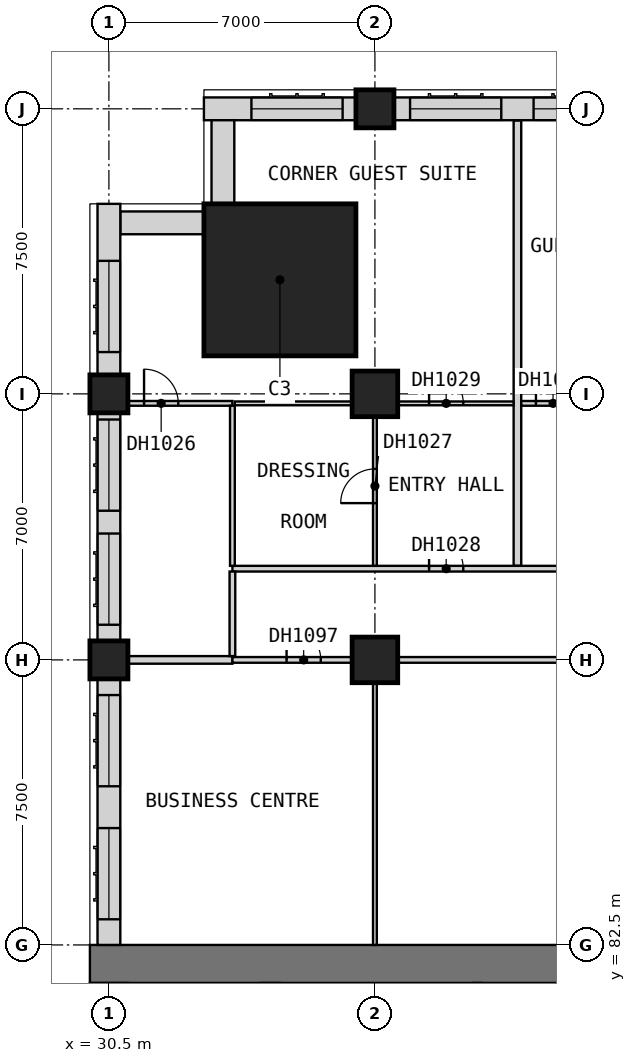
"""IFC4 building model, lengths in metres.
Left out: names, types, materials, properties, quantities, classifications, styles, units other than length and angle.
Written with IfcOpenShell. Run it as: python <this file> out.ifc"""

import sys

from ifc_helpers import new_model, si_unit, direction, frame, frame_2d, origin, origin_2d, place, context, subcontext, project, spatial, rectangle, extrude, element, fill, save


model = new_model("IFC4")
c1 = context("Model", 3, precision=1e-05, world=origin(), true_north=direction((0.0, 1.0)))
c2 = subcontext(c1, "Body", "Model", "MODEL_VIEW")
j1 = project(units=[si_unit("LENGTHUNIT", "METRE"), si_unit("PLANEANGLEUNIT", "RADIAN")], contexts=[c1])
p1 = place(None, origin())
s1 = spatial("IfcSite", under=j1, at=p1, CompositionType="ELEMENT")
p2 = place(p1, origin())
s2 = spatial("IfcBuilding", under=s1, at=p2, CompositionType="ELEMENT")
p3 = place(p2, frame((0.0, 0.0, 48.4)))
s3 = spatial("IfcBuildingStorey", under=s2, at=p3, CompositionType="ELEMENT", Elevation=48.4)
for number, where, z_axis, x_axis in (
    (1, (30.5, 90.0, 0.0), (0.0, 0.0, 1.0), (1.0, 0.0, 0.0)),
    (2, (30.5, 97.0, 0.0), (0.0, 0.0, 1.0), (1.0, 0.0, 0.0)),
):
    element("IfcColumn", number, at=place(p3, frame(where, z_axis=z_axis, x_axis=x_axis)), inside=s3, PredefinedType="COLUMN", context=c2, shape_type="SweptSolid", body=[
        extrude(rectangle(XDim=1.0, YDim=1.0, at=origin_2d()), origin(), (0.0, 0.0, 1.0), 3.6),
    ])
for number, where, z_axis, x_axis in (
    (3, (37.5, 90.0, 0.0), (0.0, 0.0, 1.0), (1.0, 0.0, 0.0)),
    (4, (37.5, 97.0, 0.0), (0.0, 0.0, 1.0), (1.0, 0.0, 0.0)),
):
    element("IfcColumn", number, at=place(p3, frame(where, z_axis=z_axis, x_axis=x_axis)), inside=s3, PredefinedType="COLUMN", context=c2, shape_type="SweptSolid", body=[
        extrude(rectangle(XDim=1.2, YDim=1.2, at=origin_2d()), origin(), (0.0, 0.0, 1.0), 3.6),
    ])
p4 = place(p3, frame((37.5, 104.5, 0.0), z_axis=(0.0, 0.0, 1.0), x_axis=(1.0, 0.0, 0.0)))
e5 = element("IfcColumn", 5, at=p4, inside=s3, PredefinedType="COLUMN", context=c2, shape_type="SweptSolid", body=[
    extrude(rectangle(XDim=1.0, YDim=1.0, at=origin_2d()), origin(), (0.0, 0.0, 1.0), 3.6),
])
p5 = place(p3, frame((35.0, 100.0, 0.0), z_axis=(0.0, 0.0, 1.0), x_axis=(1.0, 0.0, 0.0)))
e6 = element("IfcColumn", 6, at=p5, inside=s3, PredefinedType="COLUMN", context=c2, shape_type="SweptSolid", body=[
    extrude(rectangle(XDim=4.0, YDim=4.0, at=origin_2d()), origin(), (0.0, 0.0, 1.0), 3.6),
])
p6 = place(p3, frame((30.0, 82.0, 0.0), z_axis=(0.0, 0.0, 1.0), x_axis=(1.0, 0.0, 0.0)))
e7 = element("IfcWall", 7, at=p6, inside=s3, PredefinedType="SHEAR", context=c2, shape_type="SweptSolid", body=[
    extrude(rectangle(XDim=30.0, YDim=1.0, at=frame_2d((15.0, 0.0))), origin(), (0.0, 0.0, 1.0), 3.6),
])
p7 = place(p3, frame((34.75, 78.3, 0.0), z_axis=(0.0, 0.0, 1.0), x_axis=(0.0, 1.0, 0.0)))
e8 = element("IfcWall", 8, at=p7, inside=s3, PredefinedType="SHEAR", context=c2, shape_type="SweptSolid", body=[
    extrude(rectangle(XDim=3.2, YDim=0.5, at=frame_2d((1.6, 0.0))), origin(), (0.0, 0.0, 1.0), 3.6),
])
p8 = place(p3, frame((44.5, 104.5, 0.0), z_axis=(0.0, 0.0, 1.0), x_axis=(-1.0, 0.0, 0.0)))
e9 = element("IfcWall", 9, at=p8, inside=s3, PredefinedType="SOLIDWALL", context=c2, shape_type="SweptSolid", body=[
    extrude(rectangle(XDim=6.5, YDim=0.6, at=frame_2d((3.25, 0.0))), origin(), (0.0, 0.0, 1.0), 2.85),
])
p9 = place(p8, frame((3.675, 0.0, 0.8)))
e10 = element("IfcOpeningElement", 10, at=p9, cuts=e9, PredefinedType="OPENING", context=c2, shape_type="SweptSolid", body=[
    extrude(rectangle(XDim=2.4, YDim=1.8, at=frame_2d((1.2, 0.9))), frame((0.0, 0.31, 0.0), z_axis=(0.0, -1.0, 0.0), x_axis=(1.0, 0.0, 0.0)), (0.0, 0.0, 1.0), 0.62),
])
p10 = place(p8, frame((0.425, 0.0, 0.8)))
e11 = element("IfcOpeningElement", 11, at=p10, cuts=e9, PredefinedType="OPENING", context=c2, shape_type="SweptSolid", body=[
    extrude(rectangle(XDim=2.4, YDim=1.8, at=frame_2d((1.2, 0.9))), frame((0.0, 0.31, 0.0), z_axis=(0.0, -1.0, 0.0), x_axis=(1.0, 0.0, 0.0)), (0.0, 0.0, 1.0), 0.62),
])
p11 = place(p3, frame((37.0, 104.5, 0.0), z_axis=(0.0, 0.0, 1.0), x_axis=(-1.0, 0.0, 0.0)))
e12 = element("IfcWall", 12, at=p11, inside=s3, PredefinedType="SOLIDWALL", context=c2, shape_type="SweptSolid", body=[
    extrude(rectangle(XDim=4.0, YDim=0.6, at=frame_2d((2.0, 0.0))), origin(), (0.0, 0.0, 1.0), 3.35),
])
p12 = place(p11, frame((0.35, 0.0, 0.8)))
e13 = element("IfcOpeningElement", 13, at=p12, cuts=e12, PredefinedType="OPENING", context=c2, shape_type="SweptSolid", body=[
    extrude(rectangle(XDim=2.4, YDim=1.8, at=frame_2d((1.2, 0.9))), frame((0.0, 0.31, 0.0), z_axis=(0.0, -1.0, 0.0), x_axis=(1.0, 0.0, 0.0)), (0.0, 0.0, 1.0), 0.62),
])
for number, where, z_axis, x_axis in (
    (14, (33.5, 104.2, 0.0), (0.0, 0.0, 1.0), (0.0, -1.0, 0.0)),
    (15, (33.0, 101.5, 0.0), (0.0, 0.0, 1.0), (-1.0, 0.0, 0.0)),
):
    element("IfcWall", number, at=place(p3, frame(where, z_axis=z_axis, x_axis=x_axis)), inside=s3, PredefinedType="SOLIDWALL", context=c2, shape_type="SweptSolid", body=[
        extrude(rectangle(XDim=2.2, YDim=0.6, at=frame_2d((1.1, 0.0))), origin(), (0.0, 0.0, 1.0), 3.35),
    ])
p13 = place(p3, frame((30.5, 102.0, 0.0), z_axis=(0.0, 0.0, 1.0), x_axis=(0.0, -1.0, 0.0)))
e16 = element("IfcWall", 16, at=p13, inside=s3, PredefinedType="SOLIDWALL", context=c2, shape_type="SweptSolid", body=[
    extrude(rectangle(XDim=4.5, YDim=0.6, at=frame_2d((2.25, 0.0))), origin(), (0.0, 0.0, 1.0), 3.35),
])
p14 = place(p13, frame((1.5, 0.0, 0.8)))
e17 = element("IfcOpeningElement", 17, at=p14, cuts=e16, PredefinedType="OPENING", context=c2, shape_type="SweptSolid", body=[
    extrude(rectangle(XDim=2.4, YDim=1.8, at=frame_2d((1.2, 0.9))), frame((0.0, 0.31, 0.0), z_axis=(0.0, -1.0, 0.0), x_axis=(1.0, 0.0, 0.0)), (0.0, 0.0, 1.0), 0.62),
])
p15 = place(p3, frame((30.5, 96.5, 0.0), z_axis=(0.0, 0.0, 1.0), x_axis=(0.0, -1.0, 0.0)))
e18 = element("IfcWall", 18, at=p15, inside=s3, PredefinedType="SOLIDWALL", context=c2, shape_type="SweptSolid", body=[
    extrude(rectangle(XDim=6.0, YDim=0.6, at=frame_2d((3.0, 0.0))), origin(), (0.0, 0.0, 1.0), 2.85),
])
p16 = place(p15, frame((3.175, 0.0, 0.8)))
e19 = element("IfcOpeningElement", 19, at=p16, cuts=e18, PredefinedType="OPENING", context=c2, shape_type="SweptSolid", body=[
    extrude(rectangle(XDim=2.4, YDim=1.8, at=frame_2d((1.2, 0.9))), frame((0.0, 0.31, 0.0), z_axis=(0.0, -1.0, 0.0), x_axis=(1.0, 0.0, 0.0)), (0.0, 0.0, 1.0), 0.62),
])
p17 = place(p15, frame((0.175, 0.0, 0.8)))
e20 = element("IfcOpeningElement", 20, at=p17, cuts=e18, PredefinedType="OPENING", context=c2, shape_type="SweptSolid", body=[
    extrude(rectangle(XDim=2.4, YDim=1.8, at=frame_2d((1.2, 0.9))), frame((0.0, 0.31, 0.0), z_axis=(0.0, -1.0, 0.0), x_axis=(1.0, 0.0, 0.0)), (0.0, 0.0, 1.0), 0.62),
])
p18 = place(p3, frame((30.5, 89.5, 0.0), z_axis=(0.0, 0.0, 1.0), x_axis=(0.0, -1.0, 0.0)))
e21 = element("IfcWall", 21, at=p18, inside=s3, PredefinedType="SOLIDWALL", context=c2, shape_type="SweptSolid", body=[
    extrude(rectangle(XDim=7.0, YDim=0.6, at=frame_2d((3.5, 0.0))), origin(), (0.0, 0.0, 1.0), 3.35),
])
p19 = place(p18, frame((3.925, 0.0, 0.8)))
e22 = element("IfcOpeningElement", 22, at=p19, cuts=e21, PredefinedType="OPENING", context=c2, shape_type="SweptSolid", body=[
    extrude(rectangle(XDim=2.4, YDim=1.8, at=frame_2d((1.2, 0.9))), frame((0.0, 0.31, 0.0), z_axis=(0.0, -1.0, 0.0), x_axis=(1.0, 0.0, 0.0)), (0.0, 0.0, 1.0), 0.62),
])
p20 = place(p18, frame((0.425, 0.0, 0.8)))
e23 = element("IfcOpeningElement", 23, at=p20, cuts=e21, PredefinedType="OPENING", context=c2, shape_type="SweptSolid", body=[
    extrude(rectangle(XDim=2.4, YDim=1.8, at=frame_2d((1.2, 0.9))), frame((0.0, 0.31, 0.0), z_axis=(0.0, -1.0, 0.0), x_axis=(1.0, 0.0, 0.0)), (0.0, 0.0, 1.0), 0.62),
])
p21 = place(p3, frame((30.0, 90.0, 0.0), z_axis=(0.0, 0.0, 1.0), x_axis=(1.0, 0.0, 0.0)))
e24 = element("IfcWall", 24, at=p21, inside=s3, PredefinedType="PARTITIONING", context=c2, shape_type="SweptSolid", body=[
    extrude(rectangle(XDim=3.75, YDim=0.2, at=frame_2d((1.875, 0.0))), origin(), (0.0, 0.0, 1.0), 3.35),
])
p22 = place(p3, frame((41.25, 92.475, 0.0), z_axis=(0.0, 0.0, 1.0), x_axis=(0.0, 1.0, 0.0)))
e25 = element("IfcWall", 25, at=p22, inside=s3, PredefinedType="PARTITIONING", context=c2, shape_type="SweptSolid", body=[
    extrude(rectangle(XDim=11.715, YDim=0.2, at=frame_2d((5.857, 0.0))), origin(), (0.0, 0.0, 1.0), 3.35),
])
p23 = place(p3, frame((33.75, 90.0, 0.0), z_axis=(0.0, 0.0, 1.0), x_axis=(1.0, 0.0, 0.0)))
e26 = element("IfcWall", 26, at=p23, inside=s3, PredefinedType="PARTITIONING", context=c2, shape_type="SweptSolid", body=[
    extrude(rectangle(XDim=41.25, YDim=0.15, at=frame_2d((20.625, 0.0))), origin(), (0.0, 0.0, 1.0), 3.35),
])
p24 = place(p23, frame((1.425, 0.0, 0.0)))
e27 = element("IfcOpeningElement", 27, at=p24, cuts=e26, PredefinedType="OPENING", context=c2, shape_type="SweptSolid", body=[
    extrude(rectangle(XDim=0.9, YDim=2.1, at=frame_2d((0.45, 1.05))), frame((0.0, 0.085, 0.0), z_axis=(0.0, -1.0, 0.0), x_axis=(1.0, 0.0, 0.0)), (0.0, 0.0, 1.0), 0.17),
])
p25 = place(p23, frame((12.45, 0.0, 0.0)))
e28 = element("IfcOpeningElement", 28, at=p25, cuts=e26, PredefinedType="OPENING", context=c2, shape_type="SweptSolid", body=[
    extrude(rectangle(XDim=0.9, YDim=2.1, at=frame_2d((0.45, 1.05))), frame((0.0, 0.085, 0.0), z_axis=(0.0, -1.0, 0.0), x_axis=(1.0, 0.0, 0.0)), (0.0, 0.0, 1.0), 0.17),
])
p26 = place(p3, frame((33.75, 92.4, 0.0), z_axis=(0.0, 0.0, 1.0), x_axis=(1.0, 0.0, 0.0)))
e29 = element("IfcWall", 29, at=p26, inside=s3, PredefinedType="PARTITIONING", context=c2, shape_type="SweptSolid", body=[
    extrude(rectangle(XDim=43.65, YDim=0.15, at=frame_2d((21.825, 0.0))), origin(), (0.0, 0.0, 1.0), 3.35),
])
p27 = place(p26, frame((5.175, 0.0, 0.0)))
e30 = element("IfcOpeningElement", 30, at=p27, cuts=e29, PredefinedType="OPENING", context=c2, shape_type="SweptSolid", body=[
    extrude(rectangle(XDim=0.9, YDim=2.1, at=frame_2d((0.45, 1.05))), frame((0.0, 0.085, 0.0), z_axis=(0.0, -1.0, 0.0), x_axis=(1.0, 0.0, 0.0)), (0.0, 0.0, 1.0), 0.17),
])
p28 = place(p26, frame((9.863, 0.0, 0.0)))
e31 = element("IfcOpeningElement", 31, at=p28, cuts=e29, PredefinedType="OPENING", context=c2, shape_type="SweptSolid", body=[
    extrude(rectangle(XDim=0.9, YDim=2.1, at=frame_2d((0.45, 1.05))), frame((0.0, 0.085, 0.0), z_axis=(0.0, -1.0, 0.0), x_axis=(1.0, 0.0, 0.0)), (0.0, 0.0, 1.0), 0.17),
])
p29 = place(p26, frame((13.613, 0.0, 0.0)))
e32 = element("IfcOpeningElement", 32, at=p29, cuts=e29, PredefinedType="OPENING", context=c2, shape_type="SweptSolid", body=[
    extrude(rectangle(XDim=0.9, YDim=2.1, at=frame_2d((0.45, 1.05))), frame((0.0, 0.085, 0.0), z_axis=(0.0, -1.0, 0.0), x_axis=(1.0, 0.0, 0.0)), (0.0, 0.0, 1.0), 0.17),
])
p30 = place(p26, frame((17.363, 0.0, 0.0)))
e33 = element("IfcOpeningElement", 33, at=p30, cuts=e29, PredefinedType="OPENING", context=c2, shape_type="SweptSolid", body=[
    extrude(rectangle(XDim=0.9, YDim=2.1, at=frame_2d((0.45, 1.05))), frame((0.0, 0.085, 0.0), z_axis=(0.0, -1.0, 0.0), x_axis=(1.0, 0.0, 0.0)), (0.0, 0.0, 1.0), 0.17),
])
p31 = place(p26, frame((21.113, 0.0, 0.0)))
e34 = element("IfcOpeningElement", 34, at=p31, cuts=e29, PredefinedType="OPENING", context=c2, shape_type="SweptSolid", body=[
    extrude(rectangle(XDim=0.9, YDim=2.1, at=frame_2d((0.45, 1.05))), frame((0.0, 0.085, 0.0), z_axis=(0.0, -1.0, 0.0), x_axis=(1.0, 0.0, 0.0)), (0.0, 0.0, 1.0), 0.17),
])
p32 = place(p26, frame((28.05, 0.0, 0.0)))
e35 = element("IfcOpeningElement", 35, at=p32, cuts=e29, PredefinedType="OPENING", context=c2, shape_type="SweptSolid", body=[
    extrude(rectangle(XDim=0.9, YDim=2.1, at=frame_2d((0.45, 1.05))), frame((0.0, 0.085, 0.0), z_axis=(0.0, -1.0, 0.0), x_axis=(1.0, 0.0, 0.0)), (0.0, 0.0, 1.0), 0.17),
])
p33 = place(p26, frame((32.363, 0.0, 0.0)))
e36 = element("IfcOpeningElement", 36, at=p33, cuts=e29, PredefinedType="OPENING", context=c2, shape_type="SweptSolid", body=[
    extrude(rectangle(XDim=0.9, YDim=2.1, at=frame_2d((0.45, 1.05))), frame((0.0, 0.085, 0.0), z_axis=(0.0, -1.0, 0.0), x_axis=(1.0, 0.0, 0.0)), (0.0, 0.0, 1.0), 0.17),
])
p34 = place(p26, frame((39.3, 0.0, 0.0)))
e37 = element("IfcOpeningElement", 37, at=p34, cuts=e29, PredefinedType="OPENING", context=c2, shape_type="SweptSolid", body=[
    extrude(rectangle(XDim=0.9, YDim=2.1, at=frame_2d((0.45, 1.05))), frame((0.0, 0.085, 0.0), z_axis=(0.0, -1.0, 0.0), x_axis=(1.0, 0.0, 0.0)), (0.0, 0.0, 1.0), 0.17),
])
p35 = place(p26, frame((42.0, 0.0, 0.0)))
e38 = element("IfcOpeningElement", 38, at=p35, cuts=e29, PredefinedType="OPENING", context=c2, shape_type="SweptSolid", body=[
    extrude(rectangle(XDim=0.9, YDim=2.1, at=frame_2d((0.45, 1.05))), frame((0.0, 0.085, 0.0), z_axis=(0.0, -1.0, 0.0), x_axis=(1.0, 0.0, 0.0)), (0.0, 0.0, 1.0), 0.17),
])
p36 = place(p3, frame((33.75, 90.1, 0.0), z_axis=(0.0, 0.0, 1.0), x_axis=(0.0, 1.0, 0.0)))
e39 = element("IfcWall", 39, at=p36, inside=s3, PredefinedType="PARTITIONING", context=c2, shape_type="SweptSolid", body=[
    extrude(rectangle(XDim=2.225, YDim=0.15, at=frame_2d((1.112, 0.0))), origin(), (0.0, 0.0, 1.0), 3.35),
])
p37 = place(p3, frame((33.812, 96.75, 0.0), z_axis=(0.0, 0.0, 1.0), x_axis=(1.0, 0.0, 0.0)))
e40 = element("IfcWall", 40, at=p37, inside=s3, PredefinedType="PARTITIONING", context=c2, shape_type="SweptSolid", body=[
    extrude(rectangle(XDim=7.337, YDim=0.1, at=frame_2d((3.669, 0.0))), origin(), (0.0, 0.0, 1.0), 3.35),
])
p38 = place(p37, frame((5.113, 0.0, 0.0)))
e41 = element("IfcOpeningElement", 41, at=p38, cuts=e40, PredefinedType="OPENING", context=c2, shape_type="SweptSolid", body=[
    extrude(rectangle(XDim=0.9, YDim=2.1, at=frame_2d((0.45, 1.05))), frame((0.0, 0.06, 0.0), z_axis=(0.0, -1.0, 0.0), x_axis=(1.0, 0.0, 0.0)), (0.0, 0.0, 1.0), 0.12),
])
p39 = place(p3, frame((37.5, 82.5, 0.0), z_axis=(0.0, 0.0, 1.0), x_axis=(0.0, 1.0, 0.0)))
e42 = element("IfcWall", 42, at=p39, inside=s3, PredefinedType="PARTITIONING", context=c2, shape_type="SweptSolid", body=[
    extrude(rectangle(XDim=7.425, YDim=0.1, at=frame_2d((3.712, 0.0))), origin(), (0.0, 0.0, 1.0), 3.35),
])
p40 = place(p3, frame((37.5, 92.475, 0.0), z_axis=(0.0, 0.0, 1.0), x_axis=(0.0, 1.0, 0.0)))
e43 = element("IfcWall", 43, at=p40, inside=s3, PredefinedType="PARTITIONING", context=c2, shape_type="SweptSolid", body=[
    extrude(rectangle(XDim=4.225, YDim=0.1, at=frame_2d((2.112, 0.0))), origin(), (0.0, 0.0, 1.0), 3.35),
])
p41 = place(p40, frame((1.65, 0.0, 0.0)))
e44 = element("IfcOpeningElement", 44, at=p41, cuts=e43, PredefinedType="OPENING", context=c2, shape_type="SweptSolid", body=[
    extrude(rectangle(XDim=0.9, YDim=2.1, at=frame_2d((0.45, 1.05))), frame((0.0, 0.06, 0.0), z_axis=(0.0, -1.0, 0.0), x_axis=(1.0, 0.0, 0.0)), (0.0, 0.0, 1.0), 0.12),
])
p42 = place(p3, frame((30.0, 96.75, 0.0), z_axis=(0.0, 0.0, 1.0), x_axis=(1.0, 0.0, 0.0)))
e45 = element("IfcWall", 45, at=p42, inside=s3, PredefinedType="PARTITIONING", context=c2, shape_type="SweptSolid", body=[
    extrude(rectangle(XDim=3.75, YDim=0.125, at=frame_2d((1.875, 0.0))), origin(), (0.0, 0.0, 1.0), 3.35),
])
p43 = place(p42, frame((1.425, 0.0, 0.0)))
e46 = element("IfcOpeningElement", 46, at=p43, cuts=e45, PredefinedType="OPENING", context=c2, shape_type="SweptSolid", body=[
    extrude(rectangle(XDim=0.9, YDim=2.1, at=frame_2d((0.45, 1.05))), frame((0.0, 0.073, 0.0), z_axis=(0.0, -1.0, 0.0), x_axis=(1.0, 0.0, 0.0)), (0.0, 0.0, 1.0), 0.145),
])
p44 = place(p3, frame((41.35, 96.75, 0.0), z_axis=(0.0, 0.0, 1.0), x_axis=(1.0, 0.0, 0.0)))
e47 = element("IfcWall", 47, at=p44, inside=s3, PredefinedType="PARTITIONING", context=c2, shape_type="SweptSolid", body=[
    extrude(rectangle(XDim=1.775, YDim=0.125, at=frame_2d((0.887, 0.0))), origin(), (0.0, 0.0, 1.0), 3.35),
])
p45 = place(p44, frame((0.387, 0.0, 0.0)))
e48 = element("IfcOpeningElement", 48, at=p45, cuts=e47, PredefinedType="OPENING", context=c2, shape_type="SweptSolid", body=[
    extrude(rectangle(XDim=0.9, YDim=2.1, at=frame_2d((0.45, 1.05))), frame((0.0, 0.073, 0.0), z_axis=(0.0, -1.0, 0.0), x_axis=(1.0, 0.0, 0.0)), (0.0, 0.0, 1.0), 0.145),
])
p46 = place(p3, frame((33.75, 92.475, 0.0), z_axis=(0.0, 0.0, 1.0), x_axis=(0.0, 1.0, 0.0)))
e49 = element("IfcWall", 49, at=p46, inside=s3, PredefinedType="PARTITIONING", context=c2, shape_type="SweptSolid", body=[
    extrude(rectangle(XDim=4.212, YDim=0.125, at=frame_2d((2.106, 0.0))), origin(), (0.0, 0.0, 1.0), 3.35),
])
p47 = place(p9, origin())
e50 = element("IfcWindow", 50, at=p47, inside=s3, PartitioningType="SINGLE_PANEL", PredefinedType="WINDOW", context=c2, shape_type="SweptSolid", body=[
    extrude(rectangle(XDim=2.4, YDim=1.8, at=frame_2d((1.2, 0.9))), frame((0.0, -0.07, 0.0), z_axis=(0.0, -1.0, 0.0), x_axis=(1.0, 0.0, 0.0)), (0.0, 0.0, 1.0), 0.06),
])
fill(e10, e50)
p48 = place(p10, origin())
e51 = element("IfcWindow", 51, at=p48, inside=s3, PartitioningType="SINGLE_PANEL", PredefinedType="WINDOW", context=c2, shape_type="SweptSolid", body=[
    extrude(rectangle(XDim=2.4, YDim=1.8, at=frame_2d((1.2, 0.9))), frame((0.0, -0.07, 0.0), z_axis=(0.0, -1.0, 0.0), x_axis=(1.0, 0.0, 0.0)), (0.0, 0.0, 1.0), 0.06),
])
fill(e11, e51)
p49 = place(p12, origin())
e52 = element("IfcWindow", 52, at=p49, inside=s3, PartitioningType="SINGLE_PANEL", PredefinedType="WINDOW", context=c2, shape_type="SweptSolid", body=[
    extrude(rectangle(XDim=2.4, YDim=1.8, at=frame_2d((1.2, 0.9))), frame((0.0, -0.07, 0.0), z_axis=(0.0, -1.0, 0.0), x_axis=(1.0, 0.0, 0.0)), (0.0, 0.0, 1.0), 0.06),
])
fill(e13, e52)
p50 = place(p14, origin())
e53 = element("IfcWindow", 53, at=p50, inside=s3, PartitioningType="SINGLE_PANEL", PredefinedType="WINDOW", context=c2, shape_type="SweptSolid", body=[
    extrude(rectangle(XDim=2.4, YDim=1.8, at=frame_2d((1.2, 0.9))), frame((0.0, -0.07, 0.0), z_axis=(0.0, -1.0, 0.0), x_axis=(1.0, 0.0, 0.0)), (0.0, 0.0, 1.0), 0.06),
])
fill(e17, e53)
p51 = place(p16, origin())
e54 = element("IfcWindow", 54, at=p51, inside=s3, PartitioningType="SINGLE_PANEL", PredefinedType="WINDOW", context=c2, shape_type="SweptSolid", body=[
    extrude(rectangle(XDim=2.4, YDim=1.8, at=frame_2d((1.2, 0.9))), frame((0.0, -0.07, 0.0), z_axis=(0.0, -1.0, 0.0), x_axis=(1.0, 0.0, 0.0)), (0.0, 0.0, 1.0), 0.06),
])
fill(e19, e54)
p52 = place(p17, origin())
e55 = element("IfcWindow", 55, at=p52, inside=s3, PartitioningType="SINGLE_PANEL", PredefinedType="WINDOW", context=c2, shape_type="SweptSolid", body=[
    extrude(rectangle(XDim=2.4, YDim=1.8, at=frame_2d((1.2, 0.9))), frame((0.0, -0.07, 0.0), z_axis=(0.0, -1.0, 0.0), x_axis=(1.0, 0.0, 0.0)), (0.0, 0.0, 1.0), 0.06),
])
fill(e20, e55)
p53 = place(p19, origin())
e56 = element("IfcWindow", 56, at=p53, inside=s3, PartitioningType="SINGLE_PANEL", PredefinedType="WINDOW", context=c2, shape_type="SweptSolid", body=[
    extrude(rectangle(XDim=2.4, YDim=1.8, at=frame_2d((1.2, 0.9))), frame((0.0, -0.07, 0.0), z_axis=(0.0, -1.0, 0.0), x_axis=(1.0, 0.0, 0.0)), (0.0, 0.0, 1.0), 0.06),
])
fill(e22, e56)
p54 = place(p20, origin())
e57 = element("IfcWindow", 57, at=p54, inside=s3, PartitioningType="SINGLE_PANEL", PredefinedType="WINDOW", context=c2, shape_type="SweptSolid", body=[
    extrude(rectangle(XDim=2.4, YDim=1.8, at=frame_2d((1.2, 0.9))), frame((0.0, -0.07, 0.0), z_axis=(0.0, -1.0, 0.0), x_axis=(1.0, 0.0, 0.0)), (0.0, 0.0, 1.0), 0.06),
])
fill(e23, e57)
p55 = place(p43, origin())
e58 = element("IfcDoor", 58, at=p55, inside=s3, OperationType="SINGLE_SWING_RIGHT", PredefinedType="DOOR", context=c2, shape_type="SweptSolid", body=[
    extrude(rectangle(XDim=0.9, YDim=2.1, at=frame_2d((0.45, 1.05))), frame((0.0, 0.025, 0.0), z_axis=(0.0, -1.0, 0.0), x_axis=(1.0, 0.0, 0.0)), (0.0, 0.0, 1.0), 0.05),
])
fill(e46, e58)
p56 = place(p41, origin())
e59 = element("IfcDoor", 59, at=p56, inside=s3, OperationType="SINGLE_SWING_RIGHT", PredefinedType="DOOR", context=c2, shape_type="SweptSolid", body=[
    extrude(rectangle(XDim=0.9, YDim=2.1, at=frame_2d((0.45, 1.05))), frame((0.0, 0.025, 0.0), z_axis=(0.0, -1.0, 0.0), x_axis=(1.0, 0.0, 0.0)), (0.0, 0.0, 1.0), 0.05),
])
fill(e44, e59)
p57 = place(p27, origin())
e60 = element("IfcDoor", 60, at=p57, inside=s3, OperationType="SINGLE_SWING_LEFT", PredefinedType="DOOR", context=c2, shape_type="SweptSolid", body=[
    extrude(rectangle(XDim=0.9, YDim=2.1, at=frame_2d((0.45, 1.05))), frame((0.0, 0.025, 0.0), z_axis=(0.0, -1.0, 0.0), x_axis=(1.0, 0.0, 0.0)), (0.0, 0.0, 1.0), 0.05),
])
fill(e30, e60)
p58 = place(p38, origin())
e61 = element("IfcDoor", 61, at=p58, inside=s3, OperationType="SINGLE_SWING_RIGHT", PredefinedType="DOOR", context=c2, shape_type="SweptSolid", body=[
    extrude(rectangle(XDim=0.9, YDim=2.1, at=frame_2d((0.45, 1.05))), frame((0.0, 0.025, 0.0), z_axis=(0.0, -1.0, 0.0), x_axis=(1.0, 0.0, 0.0)), (0.0, 0.0, 1.0), 0.05),
])
fill(e41, e61)
p59 = place(p45, origin())
e62 = element("IfcDoor", 62, at=p59, inside=s3, OperationType="SINGLE_SWING_RIGHT", PredefinedType="DOOR", context=c2, shape_type="SweptSolid", body=[
    extrude(rectangle(XDim=0.9, YDim=2.1, at=frame_2d((0.45, 1.05))), frame((0.0, 0.025, 0.0), z_axis=(0.0, -1.0, 0.0), x_axis=(1.0, 0.0, 0.0)), (0.0, 0.0, 1.0), 0.05),
])
fill(e48, e62)
p60 = place(p24, origin())
e63 = element("IfcDoor", 63, at=p60, inside=s3, OperationType="SINGLE_SWING_RIGHT", PredefinedType="DOOR", context=c2, shape_type="SweptSolid", body=[
    extrude(rectangle(XDim=0.9, YDim=2.1, at=frame_2d((0.45, 1.05))), frame((0.0, 0.025, 0.0), z_axis=(0.0, -1.0, 0.0), x_axis=(1.0, 0.0, 0.0)), (0.0, 0.0, 1.0), 0.05),
])
fill(e27, e63)
save(model, sys.argv[1])
